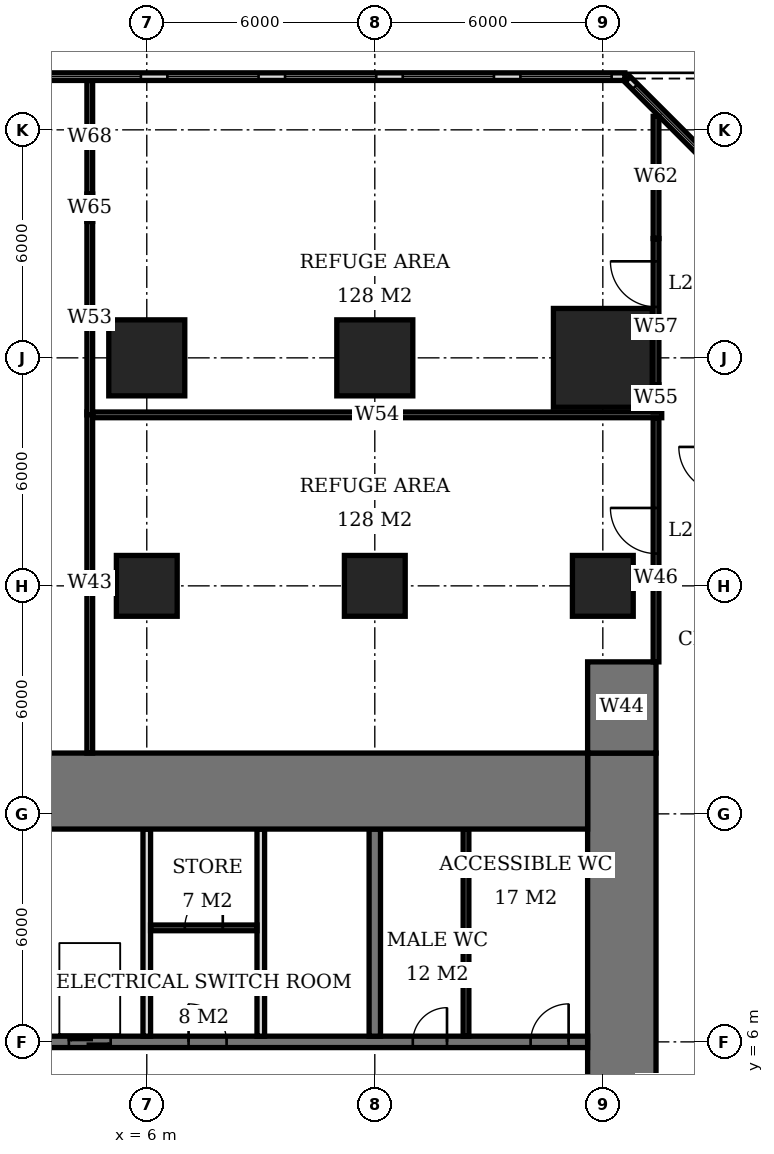
"""IFC4 building model, lengths in metres.
Left out: names, types, materials, properties, quantities, classifications, styles, units other than length and angle.
Written with IfcOpenShell. Run it as: python <this file> out.ifc"""

import sys

from ifc_helpers import new_model, si_unit, direction, frame, frame_2d, origin, origin_2d, place, context, subcontext, project, spatial, rectangle, extrude, element, fill, save


model = new_model("IFC4")
c1 = context("Model", 3, precision=1e-05, world=origin(), true_north=direction((0.0, 1.0)))
c2 = subcontext(c1, "Body", "Model", "MODEL_VIEW")
j1 = project(units=[si_unit("LENGTHUNIT", "METRE"), si_unit("PLANEANGLEUNIT", "RADIAN")], contexts=[c1])
p1 = place(None, origin())
s1 = spatial("IfcSite", under=j1, at=p1, CompositionType="ELEMENT")
p2 = place(p1, origin())
s2 = spatial("IfcBuilding", under=s1, at=p2, CompositionType="ELEMENT")
p3 = place(p2, frame((0.0, 0.0, 88.4)))
s3 = spatial("IfcBuildingStorey", under=s2, at=p3, CompositionType="ELEMENT", Elevation=88.4)
p4 = place(p3, frame((6.0, 18.0, 0.0), z_axis=(0.0, 0.0, 1.0), x_axis=(1.0, 0.0, 0.0)))
e1 = element("IfcColumn", 1, at=p4, inside=s3, PredefinedType="COLUMN", context=c2, shape_type="SweptSolid", body=[
    extrude(rectangle(XDim=1.6, YDim=1.6, at=origin_2d()), origin(), (0.0, 0.0, 1.0), 5.4),
])
p5 = place(p3, frame((6.0, 24.0, 0.0), z_axis=(0.0, 0.0, 1.0), x_axis=(1.0, 0.0, 0.0)))
e2 = element("IfcColumn", 2, at=p5, inside=s3, PredefinedType="COLUMN", context=c2, shape_type="SweptSolid", body=[
    extrude(rectangle(XDim=2.0, YDim=2.0, at=origin_2d()), origin(), (0.0, 0.0, 1.0), 5.4),
])
p6 = place(p3, frame((12.0, 18.0, 0.0), z_axis=(0.0, 0.0, 1.0), x_axis=(1.0, 0.0, 0.0)))
e3 = element("IfcColumn", 3, at=p6, inside=s3, PredefinedType="COLUMN", context=c2, shape_type="SweptSolid", body=[
    extrude(rectangle(XDim=1.6, YDim=1.6, at=origin_2d()), origin(), (0.0, 0.0, 1.0), 5.4),
])
p7 = place(p3, frame((12.0, 24.0, 0.0), z_axis=(0.0, 0.0, 1.0), x_axis=(1.0, 0.0, 0.0)))
e4 = element("IfcColumn", 4, at=p7, inside=s3, PredefinedType="COLUMN", context=c2, shape_type="SweptSolid", body=[
    extrude(rectangle(XDim=2.0, YDim=2.0, at=origin_2d()), origin(), (0.0, 0.0, 1.0), 5.4),
])
p8 = place(p3, frame((18.0, 18.0, 0.0), z_axis=(0.0, 0.0, 1.0), x_axis=(1.0, 0.0, 0.0)))
e5 = element("IfcColumn", 5, at=p8, inside=s3, PredefinedType="COLUMN", context=c2, shape_type="SweptSolid", body=[
    extrude(rectangle(XDim=1.6, YDim=1.6, at=origin_2d()), origin(), (0.0, 0.0, 1.0), 5.4),
])
p9 = place(p3, frame((18.0, 24.0, 0.0), z_axis=(0.0, 0.0, 1.0), x_axis=(1.0, 0.0, 0.0)))
e6 = element("IfcColumn", 6, at=p9, inside=s3, PredefinedType="COLUMN", context=c2, shape_type="SweptSolid", body=[
    extrude(rectangle(XDim=2.6, YDim=2.6, at=origin_2d()), origin(), (0.0, 0.0, 1.0), 5.4),
])
p10 = place(p3, frame((-5.6, 12.6, 0.0), z_axis=(0.0, 0.0, 1.0), x_axis=(1.0, 0.0, 0.0)))
e7 = element("IfcWall", 7, at=p10, inside=s3, PredefinedType="SHEAR", context=c2, shape_type="SweptSolid", body=[
    extrude(rectangle(XDim=23.2, YDim=2.0, at=frame_2d((11.6, 0.0))), origin(), (0.0, 0.0, 1.0), 5.4),
])
p11 = place(p3, frame((18.5, -7.6, 0.0), z_axis=(0.0, 0.0, 1.0), x_axis=(0.0, 1.0, 0.0)))
e8 = element("IfcWall", 8, at=p11, inside=s3, PredefinedType="SHEAR", context=c2, shape_type="SweptSolid", body=[
    extrude(rectangle(XDim=21.2, YDim=1.8, at=frame_2d((10.6, 0.0))), origin(), (0.0, 0.0, 1.0), 5.4),
])
p12 = place(p11, frame((9.2, 0.0, 0.0)))
e9 = element("IfcOpeningElement", 9, at=p12, cuts=e8, PredefinedType="OPENING", context=c2, shape_type="SweptSolid", body=[
    extrude(rectangle(XDim=1.8, YDim=2.4, at=frame_2d((0.9, 1.2))), frame((0.0, 0.91, 0.0), z_axis=(0.0, -1.0, 0.0), x_axis=(1.0, 0.0, 0.0)), (0.0, 0.0, 1.0), 1.82),
])
p13 = place(p3, frame((18.5, 13.6, 0.0), z_axis=(0.0, 0.0, 1.0), x_axis=(0.0, 1.0, 0.0)))
e10 = element("IfcWall", 10, at=p13, inside=s3, PredefinedType="SHEAR", context=c2, shape_type="SweptSolid", body=[
    extrude(rectangle(XDim=2.4, YDim=1.8, at=frame_2d((1.2, 0.0))), origin(), (0.0, 0.0, 1.0), 5.4),
])
p14 = place(p3, frame((-0.15, 6.0, 0.0), z_axis=(0.0, 0.0, 1.0), x_axis=(1.0, 0.0, 0.0)))
e11 = element("IfcWall", 11, at=p14, inside=s3, PredefinedType="SHEAR", context=c2, shape_type="SweptSolid", body=[
    extrude(rectangle(XDim=17.75, YDim=0.3, at=frame_2d((8.875, 0.0))), origin(), (0.0, 0.0, 1.0), 5.4),
])
p15 = place(p14, frame((13.15, 0.0, 0.0)))
e12 = element("IfcOpeningElement", 12, at=p15, cuts=e11, PredefinedType="OPENING", context=c2, shape_type="SweptSolid", body=[
    extrude(rectangle(XDim=0.9, YDim=2.1, at=frame_2d((0.45, 1.05))), frame((0.0, 0.16, 0.0), z_axis=(0.0, -1.0, 0.0), x_axis=(1.0, 0.0, 0.0)), (0.0, 0.0, 1.0), 0.32),
])
p16 = place(p14, frame((16.25, 0.0, 0.0)))
e13 = element("IfcOpeningElement", 13, at=p16, cuts=e11, PredefinedType="OPENING", context=c2, shape_type="SweptSolid", body=[
    extrude(rectangle(XDim=1.0, YDim=2.1, at=frame_2d((0.5, 1.05))), frame((0.0, 0.16, 0.0), z_axis=(0.0, -1.0, 0.0), x_axis=(1.0, 0.0, 0.0)), (0.0, 0.0, 1.0), 0.32),
])
p17 = place(p14, frame((7.25, 0.0, 0.0)))
e14 = element("IfcOpeningElement", 14, at=p17, cuts=e11, PredefinedType="OPENING", context=c2, shape_type="SweptSolid", body=[
    extrude(rectangle(XDim=1.0, YDim=2.1, at=frame_2d((0.5, 1.05))), frame((0.0, 0.16, 0.0), z_axis=(0.0, -1.0, 0.0), x_axis=(1.0, 0.0, 0.0)), (0.0, 0.0, 1.0), 0.32),
])
p18 = place(p14, frame((1.1, 0.0, 0.0)))
e15 = element("IfcOpeningElement", 15, at=p18, cuts=e11, PredefinedType="OPENING", context=c2, shape_type="SweptSolid", body=[
    extrude(rectangle(XDim=1.1, YDim=2.1, at=frame_2d((0.55, 1.05))), frame((0.0, 0.16, 0.0), z_axis=(0.0, -1.0, 0.0), x_axis=(1.0, 0.0, 0.0)), (0.0, 0.0, 1.0), 0.32),
])
p19 = place(p14, frame((4.1, 0.0, 0.0)))
e16 = element("IfcOpeningElement", 16, at=p19, cuts=e11, PredefinedType="OPENING", context=c2, shape_type="SweptSolid", body=[
    extrude(rectangle(XDim=1.1, YDim=2.1, at=frame_2d((0.55, 1.05))), frame((0.0, 0.16, 0.0), z_axis=(0.0, -1.0, 0.0), x_axis=(1.0, 0.0, 0.0)), (0.0, 0.0, 1.0), 0.32),
])
p20 = place(p3, frame((12.0, 6.15, 0.0), z_axis=(0.0, 0.0, 1.0), x_axis=(0.0, 1.0, 0.0)))
e17 = element("IfcWall", 17, at=p20, inside=s3, PredefinedType="SHEAR", context=c2, shape_type="SweptSolid", body=[
    extrude(rectangle(XDim=5.45, YDim=0.3, at=frame_2d((2.725, 0.0))), origin(), (0.0, 0.0, 1.0), 5.4),
])
for number, where, z_axis, x_axis in (
    (18, (6.0, 6.15, 0.0), (0.0, 0.0, 1.0), (0.0, 1.0, 0.0)),
    (19, (9.0, 6.15, 0.0), (0.0, 0.0, 1.0), (0.0, 1.0, 0.0)),
):
    element("IfcWall", number, at=place(p3, frame(where, z_axis=z_axis, x_axis=x_axis)), inside=s3, PredefinedType="SOLIDWALL", context=c2, shape_type="SweptSolid", body=[
        extrude(rectangle(XDim=5.45, YDim=0.2, at=frame_2d((2.725, 0.0))), origin(), (0.0, 0.0, 1.0), 5.4),
    ])
p21 = place(p3, frame((25.329, 24.651, 0.0), z_axis=(0.0, 0.0, 1.0), x_axis=(-0.707106781187, 0.707106781187, 0.0)))
e20 = element("IfcWall", 20, at=p21, inside=s3, PredefinedType="USERDEFINED", context=c2, shape_type="SweptSolid", body=[
    extrude(rectangle(XDim=9.445, YDim=0.2, at=frame_2d((4.723, 0.0))), origin(), (0.0, 0.0, 1.0), 5.4),
])
p22 = place(p21, frame((0.274, 0.0, 0.6)))
e21 = element("IfcOpeningElement", 21, at=p22, cuts=e20, PredefinedType="OPENING", context=c2, shape_type="SweptSolid", body=[
    extrude(rectangle(XDim=2.6, YDim=3.0, at=frame_2d((1.3, 1.5))), frame((0.0, 0.11, 0.0), z_axis=(0.0, -1.0, 0.0), x_axis=(1.0, 0.0, 0.0)), (0.0, 0.0, 1.0), 0.22),
])
p23 = place(p21, frame((3.423, 0.0, 0.6)))
e22 = element("IfcOpeningElement", 22, at=p23, cuts=e20, PredefinedType="OPENING", context=c2, shape_type="SweptSolid", body=[
    extrude(rectangle(XDim=2.6, YDim=3.0, at=frame_2d((1.3, 1.5))), frame((0.0, 0.11, 0.0), z_axis=(0.0, -1.0, 0.0), x_axis=(1.0, 0.0, 0.0)), (0.0, 0.0, 1.0), 0.22),
])
p24 = place(p21, frame((6.571, 0.0, 0.6)))
e23 = element("IfcOpeningElement", 23, at=p24, cuts=e20, PredefinedType="OPENING", context=c2, shape_type="SweptSolid", body=[
    extrude(rectangle(XDim=2.6, YDim=3.0, at=frame_2d((1.3, 1.5))), frame((0.0, 0.11, 0.0), z_axis=(0.0, -1.0, 0.0), x_axis=(1.0, 0.0, 0.0)), (0.0, 0.0, 1.0), 0.22),
])
p25 = place(p3, frame((18.58, 31.4, 0.0), z_axis=(0.0, 0.0, 1.0), x_axis=(-1.0, 0.0, 0.0)))
e24 = element("IfcWall", 24, at=p25, inside=s3, PredefinedType="USERDEFINED", context=c2, shape_type="SweptSolid", body=[
    extrude(rectangle(XDim=37.16, YDim=0.2, at=frame_2d((18.58, 0.0))), origin(), (0.0, 0.0, 1.0), 5.4),
])
p26 = place(p25, frame((0.348, 0.0, 0.6)))
e25 = element("IfcOpeningElement", 25, at=p26, cuts=e24, PredefinedType="OPENING", context=c2, shape_type="SweptSolid", body=[
    extrude(rectangle(XDim=2.4, YDim=3.0, at=frame_2d((1.2, 1.5))), frame((0.0, 0.11, 0.0), z_axis=(0.0, -1.0, 0.0), x_axis=(1.0, 0.0, 0.0)), (0.0, 0.0, 1.0), 0.22),
])
p27 = place(p25, frame((3.445, 0.0, 0.6)))
e26 = element("IfcOpeningElement", 26, at=p27, cuts=e24, PredefinedType="OPENING", context=c2, shape_type="SweptSolid", body=[
    extrude(rectangle(XDim=2.4, YDim=3.0, at=frame_2d((1.2, 1.5))), frame((0.0, 0.11, 0.0), z_axis=(0.0, -1.0, 0.0), x_axis=(1.0, 0.0, 0.0)), (0.0, 0.0, 1.0), 0.22),
])
p28 = place(p25, frame((6.542, 0.0, 0.6)))
e27 = element("IfcOpeningElement", 27, at=p28, cuts=e24, PredefinedType="OPENING", context=c2, shape_type="SweptSolid", body=[
    extrude(rectangle(XDim=2.4, YDim=3.0, at=frame_2d((1.2, 1.5))), frame((0.0, 0.11, 0.0), z_axis=(0.0, -1.0, 0.0), x_axis=(1.0, 0.0, 0.0)), (0.0, 0.0, 1.0), 0.22),
])
p29 = place(p25, frame((9.638, 0.0, 0.6)))
e28 = element("IfcOpeningElement", 28, at=p29, cuts=e24, PredefinedType="OPENING", context=c2, shape_type="SweptSolid", body=[
    extrude(rectangle(XDim=2.4, YDim=3.0, at=frame_2d((1.2, 1.5))), frame((0.0, 0.11, 0.0), z_axis=(0.0, -1.0, 0.0), x_axis=(1.0, 0.0, 0.0)), (0.0, 0.0, 1.0), 0.22),
])
p30 = place(p25, frame((12.735, 0.0, 0.6)))
e29 = element("IfcOpeningElement", 29, at=p30, cuts=e24, PredefinedType="OPENING", context=c2, shape_type="SweptSolid", body=[
    extrude(rectangle(XDim=2.4, YDim=3.0, at=frame_2d((1.2, 1.5))), frame((0.0, 0.11, 0.0), z_axis=(0.0, -1.0, 0.0), x_axis=(1.0, 0.0, 0.0)), (0.0, 0.0, 1.0), 0.22),
])
p31 = place(p25, frame((15.832, 0.0, 0.6)))
e30 = element("IfcOpeningElement", 30, at=p31, cuts=e24, PredefinedType="OPENING", context=c2, shape_type="SweptSolid", body=[
    extrude(rectangle(XDim=2.4, YDim=3.0, at=frame_2d((1.2, 1.5))), frame((0.0, 0.11, 0.0), z_axis=(0.0, -1.0, 0.0), x_axis=(1.0, 0.0, 0.0)), (0.0, 0.0, 1.0), 0.22),
])
p32 = place(p25, frame((18.928, 0.0, 0.6)))
e31 = element("IfcOpeningElement", 31, at=p32, cuts=e24, PredefinedType="OPENING", context=c2, shape_type="SweptSolid", body=[
    extrude(rectangle(XDim=2.4, YDim=3.0, at=frame_2d((1.2, 1.5))), frame((0.0, 0.11, 0.0), z_axis=(0.0, -1.0, 0.0), x_axis=(1.0, 0.0, 0.0)), (0.0, 0.0, 1.0), 0.22),
])
p33 = place(p25, frame((22.025, 0.0, 0.6)))
e32 = element("IfcOpeningElement", 32, at=p33, cuts=e24, PredefinedType="OPENING", context=c2, shape_type="SweptSolid", body=[
    extrude(rectangle(XDim=2.4, YDim=3.0, at=frame_2d((1.2, 1.5))), frame((0.0, 0.11, 0.0), z_axis=(0.0, -1.0, 0.0), x_axis=(1.0, 0.0, 0.0)), (0.0, 0.0, 1.0), 0.22),
])
p34 = place(p25, frame((25.122, 0.0, 0.6)))
e33 = element("IfcOpeningElement", 33, at=p34, cuts=e24, PredefinedType="OPENING", context=c2, shape_type="SweptSolid", body=[
    extrude(rectangle(XDim=2.4, YDim=3.0, at=frame_2d((1.2, 1.5))), frame((0.0, 0.11, 0.0), z_axis=(0.0, -1.0, 0.0), x_axis=(1.0, 0.0, 0.0)), (0.0, 0.0, 1.0), 0.22),
])
p35 = place(p25, frame((28.218, 0.0, 0.6)))
e34 = element("IfcOpeningElement", 34, at=p35, cuts=e24, PredefinedType="OPENING", context=c2, shape_type="SweptSolid", body=[
    extrude(rectangle(XDim=2.4, YDim=3.0, at=frame_2d((1.2, 1.5))), frame((0.0, 0.11, 0.0), z_axis=(0.0, -1.0, 0.0), x_axis=(1.0, 0.0, 0.0)), (0.0, 0.0, 1.0), 0.22),
])
p36 = place(p25, frame((31.315, 0.0, 0.6)))
e35 = element("IfcOpeningElement", 35, at=p36, cuts=e24, PredefinedType="OPENING", context=c2, shape_type="SweptSolid", body=[
    extrude(rectangle(XDim=2.4, YDim=3.0, at=frame_2d((1.2, 1.5))), frame((0.0, 0.11, 0.0), z_axis=(0.0, -1.0, 0.0), x_axis=(1.0, 0.0, 0.0)), (0.0, 0.0, 1.0), 0.22),
])
p37 = place(p25, frame((34.412, 0.0, 0.6)))
e36 = element("IfcOpeningElement", 36, at=p37, cuts=e24, PredefinedType="OPENING", context=c2, shape_type="SweptSolid", body=[
    extrude(rectangle(XDim=2.4, YDim=3.0, at=frame_2d((1.2, 1.5))), frame((0.0, 0.11, 0.0), z_axis=(0.0, -1.0, 0.0), x_axis=(1.0, 0.0, 0.0)), (0.0, 0.0, 1.0), 0.22),
])
p38 = place(p3, frame((14.4, 6.15, 0.0), z_axis=(0.0, 0.0, 1.0), x_axis=(0.0, 1.0, 0.0)))
e37 = element("IfcWall", 37, at=p38, inside=s3, PredefinedType="PLUMBINGWALL", context=c2, shape_type="SweptSolid", body=[
    extrude(rectangle(XDim=5.45, YDim=0.15, at=frame_2d((2.725, 0.0))), origin(), (0.0, 0.0, 1.0), 5.15),
])
p39 = place(p3, frame((6.1, 9.0, 0.0), z_axis=(0.0, 0.0, 1.0), x_axis=(1.0, 0.0, 0.0)))
e38 = element("IfcWall", 38, at=p39, inside=s3, PredefinedType="PARTITIONING", context=c2, shape_type="SweptSolid", body=[
    extrude(rectangle(XDim=2.8, YDim=0.15, at=frame_2d((1.4, 0.0))), origin(), (0.0, 0.0, 1.0), 5.15),
])
p40 = place(p39, frame((0.9, 0.0, 0.0)))
e39 = element("IfcOpeningElement", 39, at=p40, cuts=e38, PredefinedType="OPENING", context=c2, shape_type="SweptSolid", body=[
    extrude(rectangle(XDim=1.0, YDim=2.1, at=frame_2d((0.5, 1.05))), frame((0.0, 0.085, 0.0), z_axis=(0.0, -1.0, 0.0), x_axis=(1.0, 0.0, 0.0)), (0.0, 0.0, 1.0), 0.17),
])
p41 = place(p3, frame((4.5, 13.6, 0.0), z_axis=(0.0, 0.0, 1.0), x_axis=(0.0, 1.0, 0.0)))
e40 = element("IfcWall", 40, at=p41, inside=s3, PredefinedType="PARTITIONING", context=c2, shape_type="SweptSolid", body=[
    extrude(rectangle(XDim=8.975, YDim=0.15, at=frame_2d((4.487, 0.0))), origin(), (0.0, 0.0, 1.0), 5.15),
])
p42 = place(p3, frame((4.5, 22.5, 0.0), z_axis=(0.0, 0.0, 1.0), x_axis=(0.0, 1.0, 0.0)))
e41 = element("IfcWall", 41, at=p42, inside=s3, PredefinedType="PARTITIONING", context=c2, shape_type="SweptSolid", body=[
    extrude(rectangle(XDim=5.09, YDim=0.15, at=frame_2d((2.545, 0.0))), origin(), (0.0, 0.0, 1.0), 5.15),
])
p43 = place(p3, frame((4.5, 27.59, 0.0), z_axis=(0.0, 0.0, 1.0), x_axis=(0.0, 1.0, 0.0)))
e42 = element("IfcWall", 42, at=p43, inside=s3, PredefinedType="PARTITIONING", context=c2, shape_type="SweptSolid", body=[
    extrude(rectangle(XDim=0.72, YDim=0.15, at=frame_2d((0.36, 0.0))), origin(), (0.0, 0.0, 1.0), 4.15),
])
p44 = place(p3, frame((4.5, 28.31, 0.0), z_axis=(0.0, 0.0, 1.0), x_axis=(0.0, 1.0, 0.0)))
e43 = element("IfcWall", 43, at=p44, inside=s3, PredefinedType="PARTITIONING", context=c2, shape_type="SweptSolid", body=[
    extrude(rectangle(XDim=2.99, YDim=0.15, at=frame_2d((1.495, 0.0))), origin(), (0.0, 0.0, 1.0), 5.15),
])
p45 = place(p3, frame((4.575, 22.5, 0.0), z_axis=(0.0, 0.0, 1.0), x_axis=(1.0, 0.0, 0.0)))
e44 = element("IfcWall", 44, at=p45, inside=s3, PredefinedType="PARTITIONING", context=c2, shape_type="SweptSolid", body=[
    extrude(rectangle(XDim=14.975, YDim=0.15, at=frame_2d((7.488, 0.0))), origin(), (0.0, 0.0, 1.0), 5.15),
])
p46 = place(p3, frame((19.4, 16.0, 0.0), z_axis=(0.0, 0.0, 1.0), x_axis=(0.0, 1.0, 0.0)))
e45 = element("IfcWall", 45, at=p46, inside=s3, PredefinedType="PARTITIONING", context=c2, shape_type="SweptSolid", body=[
    extrude(rectangle(XDim=6.425, YDim=0.15, at=frame_2d((3.212, 0.0))), origin(), (0.0, 0.0, 1.0), 5.15),
])
p47 = place(p46, frame((2.85, 0.0, 0.0)))
e46 = element("IfcOpeningElement", 46, at=p47, cuts=e45, PredefinedType="OPENING", context=c2, shape_type="SweptSolid", body=[
    extrude(rectangle(XDim=1.2, YDim=2.4, at=frame_2d((0.6, 1.2))), frame((0.0, 0.085, 0.0), z_axis=(0.0, -1.0, 0.0), x_axis=(1.0, 0.0, 0.0)), (0.0, 0.0, 1.0), 0.17),
])
p48 = place(p3, frame((19.4, 22.575, 0.0), z_axis=(0.0, 0.0, 1.0), x_axis=(0.0, 1.0, 0.0)))
e47 = element("IfcWall", 47, at=p48, inside=s3, PredefinedType="PARTITIONING", context=c2, shape_type="SweptSolid", body=[
    extrude(rectangle(XDim=0.715, YDim=0.15, at=frame_2d((0.357, 0.0))), origin(), (0.0, 0.0, 1.0), 5.15),
])
p49 = place(p3, frame((19.4, 23.29, 0.0), z_axis=(0.0, 0.0, 1.0), x_axis=(0.0, 1.0, 0.0)))
e48 = element("IfcWall", 48, at=p49, inside=s3, PredefinedType="PARTITIONING", context=c2, shape_type="SweptSolid", body=[
    extrude(rectangle(XDim=3.85, YDim=0.15, at=frame_2d((1.925, 0.0))), origin(), (0.0, 0.0, 1.0), 4.15),
])
p50 = place(p49, frame((2.05, 0.0, 0.0)))
e49 = element("IfcOpeningElement", 49, at=p50, cuts=e48, PredefinedType="OPENING", context=c2, shape_type="SweptSolid", body=[
    extrude(rectangle(XDim=1.2, YDim=2.4, at=frame_2d((0.6, 1.2))), frame((0.0, 0.085, 0.0), z_axis=(0.0, -1.0, 0.0), x_axis=(1.0, 0.0, 0.0)), (0.0, 0.0, 1.0), 0.17),
])
p51 = place(p3, frame((19.4, 27.14, 0.0), z_axis=(0.0, 0.0, 1.0), x_axis=(0.0, 1.0, 0.0)))
e50 = element("IfcWall", 50, at=p51, inside=s3, PredefinedType="PARTITIONING", context=c2, shape_type="SweptSolid", body=[
    extrude(rectangle(XDim=3.216, YDim=0.15, at=frame_2d((1.608, 0.0))), origin(), (0.0, 0.0, 1.0), 5.15),
])
p52 = place(p24, origin())
e51 = element("IfcWindow", 51, at=p52, inside=s3, PartitioningType="SINGLE_PANEL", PredefinedType="USERDEFINED", context=c2, shape_type="SweptSolid", body=[
    extrude(rectangle(XDim=2.6, YDim=3.0, at=frame_2d((1.3, 1.5))), frame((0.0, 0.03, 0.0), z_axis=(0.0, -1.0, 0.0), x_axis=(1.0, 0.0, 0.0)), (0.0, 0.0, 1.0), 0.06),
])
fill(e23, e51)
p53 = place(p26, origin())
e52 = element("IfcWindow", 52, at=p53, inside=s3, PartitioningType="SINGLE_PANEL", PredefinedType="USERDEFINED", context=c2, shape_type="SweptSolid", body=[
    extrude(rectangle(XDim=2.4, YDim=3.0, at=frame_2d((1.2, 1.5))), frame((0.0, 0.03, 0.0), z_axis=(0.0, -1.0, 0.0), x_axis=(1.0, 0.0, 0.0)), (0.0, 0.0, 1.0), 0.06),
])
fill(e25, e52)
p54 = place(p27, origin())
e53 = element("IfcWindow", 53, at=p54, inside=s3, PartitioningType="SINGLE_PANEL", PredefinedType="USERDEFINED", context=c2, shape_type="SweptSolid", body=[
    extrude(rectangle(XDim=2.4, YDim=3.0, at=frame_2d((1.2, 1.5))), frame((0.0, 0.03, 0.0), z_axis=(0.0, -1.0, 0.0), x_axis=(1.0, 0.0, 0.0)), (0.0, 0.0, 1.0), 0.06),
])
fill(e26, e53)
p55 = place(p28, origin())
e54 = element("IfcWindow", 54, at=p55, inside=s3, PartitioningType="SINGLE_PANEL", PredefinedType="USERDEFINED", context=c2, shape_type="SweptSolid", body=[
    extrude(rectangle(XDim=2.4, YDim=3.0, at=frame_2d((1.2, 1.5))), frame((0.0, 0.03, 0.0), z_axis=(0.0, -1.0, 0.0), x_axis=(1.0, 0.0, 0.0)), (0.0, 0.0, 1.0), 0.06),
])
fill(e27, e54)
p56 = place(p29, origin())
e55 = element("IfcWindow", 55, at=p56, inside=s3, PartitioningType="SINGLE_PANEL", PredefinedType="USERDEFINED", context=c2, shape_type="SweptSolid", body=[
    extrude(rectangle(XDim=2.4, YDim=3.0, at=frame_2d((1.2, 1.5))), frame((0.0, 0.03, 0.0), z_axis=(0.0, -1.0, 0.0), x_axis=(1.0, 0.0, 0.0)), (0.0, 0.0, 1.0), 0.06),
])
fill(e28, e55)
p57 = place(p30, origin())
e56 = element("IfcWindow", 56, at=p57, inside=s3, PartitioningType="SINGLE_PANEL", PredefinedType="USERDEFINED", context=c2, shape_type="SweptSolid", body=[
    extrude(rectangle(XDim=2.4, YDim=3.0, at=frame_2d((1.2, 1.5))), frame((0.0, 0.03, 0.0), z_axis=(0.0, -1.0, 0.0), x_axis=(1.0, 0.0, 0.0)), (0.0, 0.0, 1.0), 0.06),
])
fill(e29, e56)
p58 = place(p15, origin())
e57 = element("IfcDoor", 57, at=p58, inside=s3, OperationType="SINGLE_SWING_RIGHT", PredefinedType="DOOR", context=c2, shape_type="SweptSolid", body=[
    extrude(rectangle(XDim=0.9, YDim=2.1, at=frame_2d((0.45, 1.05))), frame((0.0, 0.025, 0.0), z_axis=(0.0, -1.0, 0.0), x_axis=(1.0, 0.0, 0.0)), (0.0, 0.0, 1.0), 0.05),
])
fill(e12, e57)
p59 = place(p16, origin())
e58 = element("IfcDoor", 58, at=p59, inside=s3, OperationType="SINGLE_SWING_RIGHT", PredefinedType="DOOR", context=c2, shape_type="SweptSolid", body=[
    extrude(rectangle(XDim=1.0, YDim=2.1, at=frame_2d((0.5, 1.05))), frame((0.0, 0.025, 0.0), z_axis=(0.0, -1.0, 0.0), x_axis=(1.0, 0.0, 0.0)), (0.0, 0.0, 1.0), 0.05),
])
fill(e13, e58)
p60 = place(p40, origin())
e59 = element("IfcDoor", 59, at=p60, inside=s3, OperationType="SINGLE_SWING_RIGHT", PredefinedType="DOOR", context=c2, shape_type="SweptSolid", body=[
    extrude(rectangle(XDim=1.0, YDim=2.1, at=frame_2d((0.5, 1.05))), frame((0.0, 0.025, 0.0), z_axis=(0.0, -1.0, 0.0), x_axis=(1.0, 0.0, 0.0)), (0.0, 0.0, 1.0), 0.05),
])
fill(e39, e59)
p61 = place(p17, origin())
e60 = element("IfcDoor", 60, at=p61, inside=s3, OperationType="SINGLE_SWING_LEFT", PredefinedType="DOOR", context=c2, shape_type="SweptSolid", body=[
    extrude(rectangle(XDim=1.0, YDim=2.1, at=frame_2d((0.5, 1.05))), frame((0.0, 0.025, 0.0), z_axis=(0.0, -1.0, 0.0), x_axis=(1.0, 0.0, 0.0)), (0.0, 0.0, 1.0), 0.05),
])
fill(e14, e60)
p62 = place(p19, origin())
e61 = element("IfcDoor", 61, at=p62, inside=s3, OperationType="DOUBLE_DOOR_SLIDING", PredefinedType="USERDEFINED", context=c2, shape_type="SweptSolid", body=[
    extrude(rectangle(XDim=1.1, YDim=2.1, at=frame_2d((0.55, 1.05))), frame((0.0, 0.025, 0.0), z_axis=(0.0, -1.0, 0.0), x_axis=(1.0, 0.0, 0.0)), (0.0, 0.0, 1.0), 0.05),
])
fill(e16, e61)
p63 = place(p47, origin())
e62 = element("IfcDoor", 62, at=p63, inside=s3, OperationType="SINGLE_SWING_RIGHT", PredefinedType="DOOR", context=c2, shape_type="SweptSolid", body=[
    extrude(rectangle(XDim=1.2, YDim=2.4, at=frame_2d((0.6, 1.2))), frame((0.0, 0.025, 0.0), z_axis=(0.0, -1.0, 0.0), x_axis=(1.0, 0.0, 0.0)), (0.0, 0.0, 1.0), 0.05),
])
fill(e46, e62)
p64 = place(p50, origin())
e63 = element("IfcDoor", 63, at=p64, inside=s3, OperationType="SINGLE_SWING_RIGHT", PredefinedType="DOOR", context=c2, shape_type="SweptSolid", body=[
    extrude(rectangle(XDim=1.2, YDim=2.4, at=frame_2d((0.6, 1.2))), frame((0.0, 0.025, 0.0), z_axis=(0.0, -1.0, 0.0), x_axis=(1.0, 0.0, 0.0)), (0.0, 0.0, 1.0), 0.05),
])
fill(e49, e63)
save(model, sys.argv[1])
